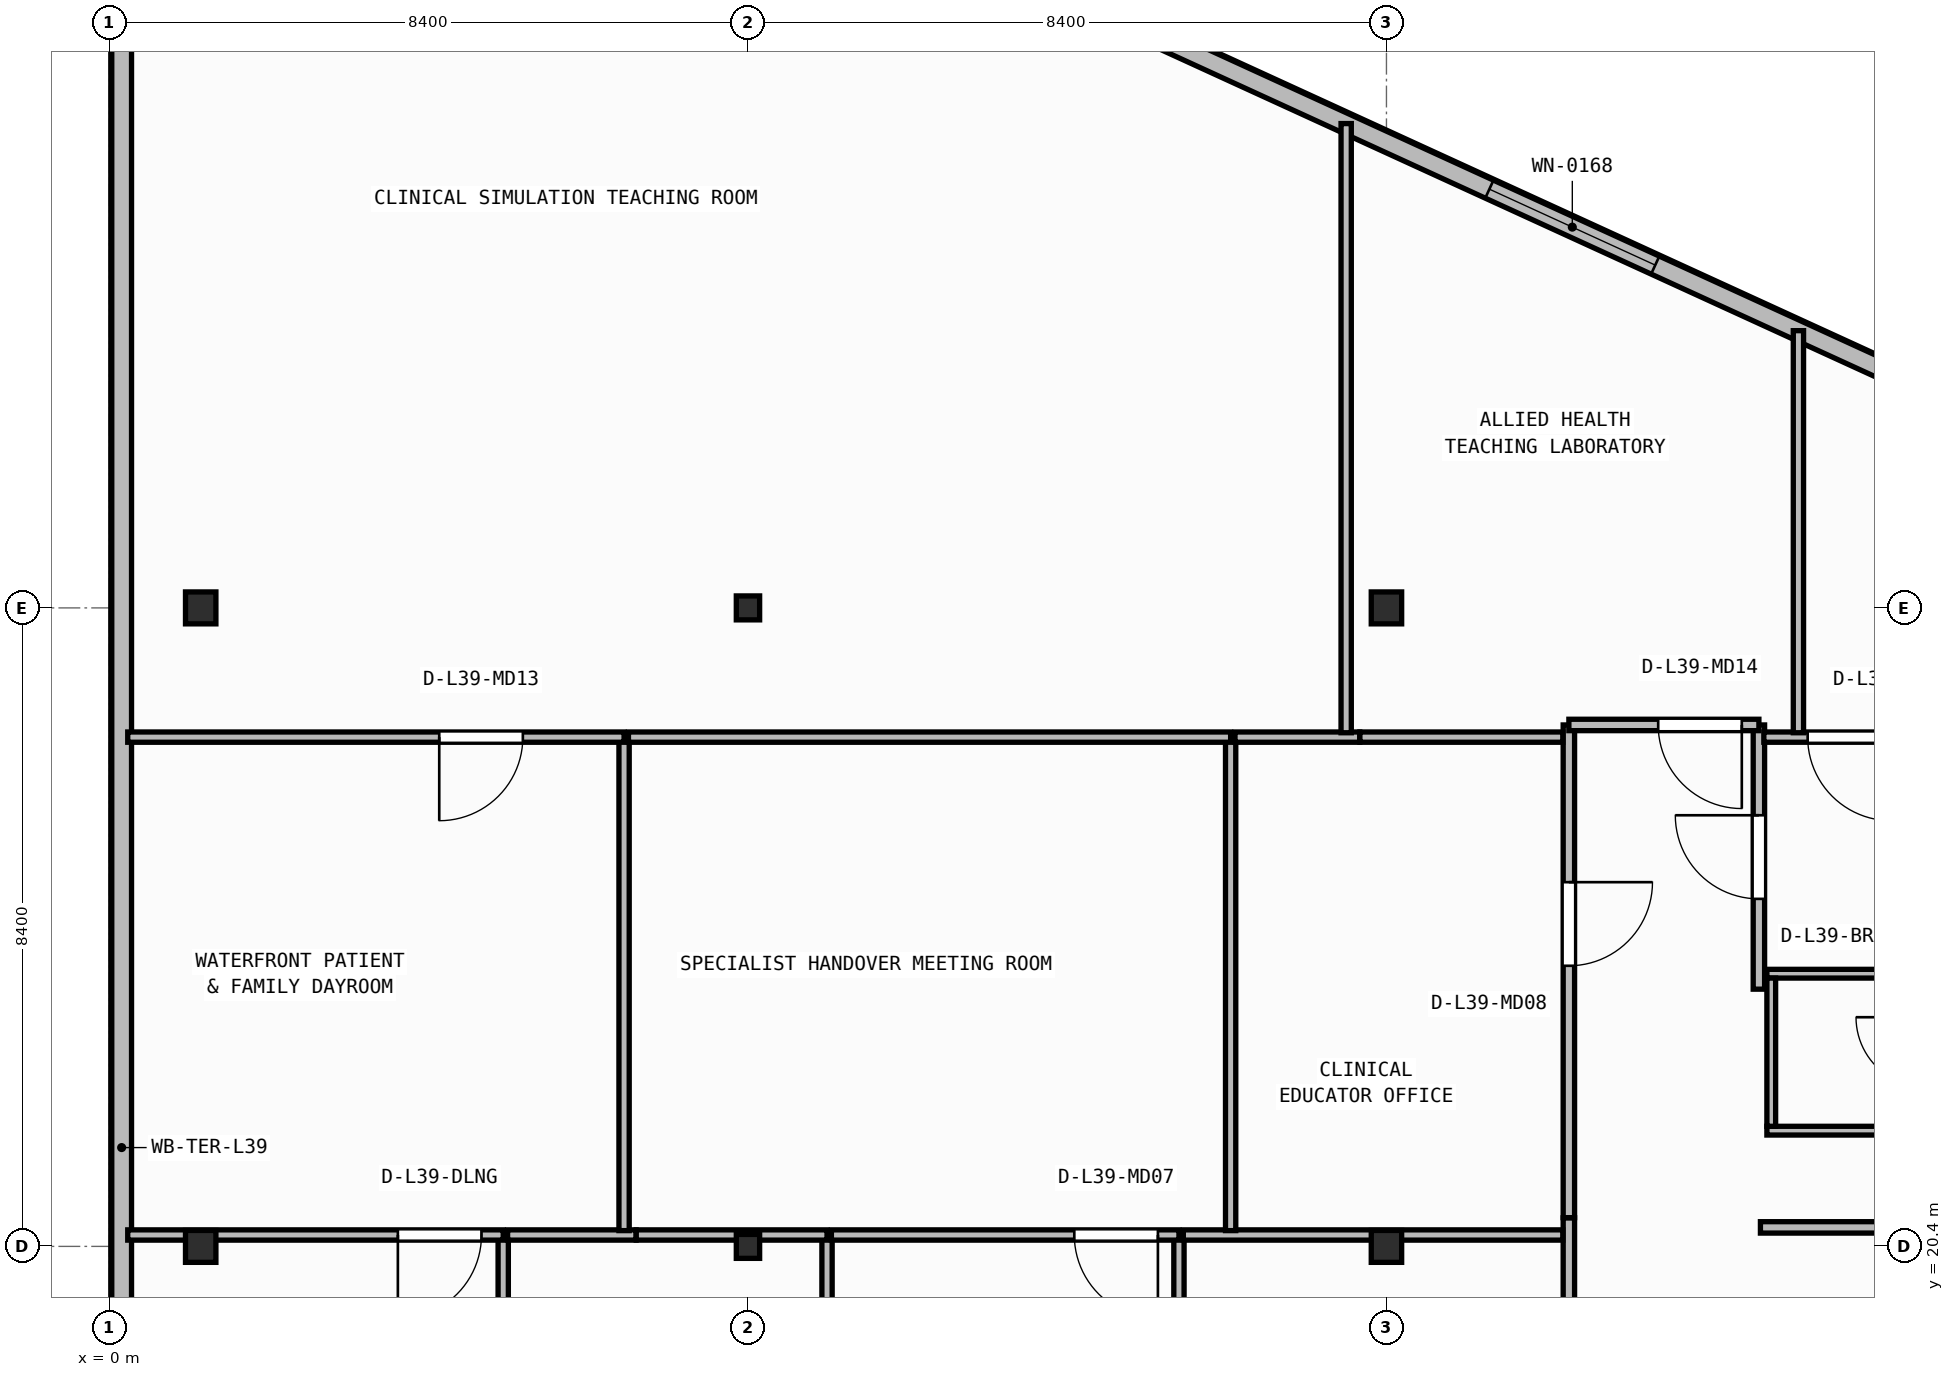
"""IFC4 building model, lengths in metres.
Left out: names, types, materials, properties, quantities, classifications, styles, units other than length and angle.
Written with IfcOpenShell. Run it as: python <this file> out.ifc"""

import sys

from ifc_helpers import new_model, si_unit, direction, frame, frame_2d, origin, origin_2d, place, context, subcontext, project, spatial, rectangle, i_section, extrude, element, fill, save


model = new_model("IFC4")
c1 = context("Model", 3, precision=1e-05, world=origin(), true_north=direction((0.0, 1.0)))
c2 = subcontext(c1, "Body", "Model", "MODEL_VIEW")
j1 = project(units=[si_unit("LENGTHUNIT", "METRE"), si_unit("PLANEANGLEUNIT", "RADIAN")], contexts=[c1])
p1 = place(None, origin())
s1 = spatial("IfcSite", under=j1, at=p1, CompositionType="ELEMENT")
p2 = place(p1, origin())
s2 = spatial("IfcBuilding", under=s1, at=p2, CompositionType="ELEMENT")
p3 = place(p2, frame((0.0, 0.0, 158.65)))
s3 = spatial("IfcBuildingStorey", under=s2, at=p3, CompositionType="ELEMENT", Elevation=158.65)
p4 = place(p3, frame((1.2, 20.4, 0.0), z_axis=(0.0, 0.0, 1.0), x_axis=(1.0, 0.0, 0.0)))
e1 = element("IfcColumn", 1, at=p4, inside=s3, PredefinedType="COLUMN", context=c2, shape_type="SweptSolid", body=[
    extrude(i_section(OverallWidth=0.4, OverallDepth=0.42, WebThickness=0.025, FlangeThickness=0.04, at=origin_2d()), origin(), (0.0, 0.0, 1.0), 3.95),
])
p5 = place(p3, frame((8.4, 20.4, 0.0), z_axis=(0.0, 0.0, 1.0), x_axis=(1.0, 0.0, 0.0)))
e2 = element("IfcColumn", 2, at=p5, inside=s3, PredefinedType="COLUMN", context=c2, shape_type="SweptSolid", body=[
    extrude(i_section(OverallWidth=0.307, OverallDepth=0.315, WebThickness=0.012, FlangeThickness=0.019, FilletRadius=0.017, at=origin_2d()), origin(), (0.0, 0.0, 1.0), 3.95),
])
for number, where, z_axis, x_axis in (
    (3, (16.8, 20.4, 0.0), (0.0, 0.0, 1.0), (1.0, 0.0, 0.0)),
    (4, (1.2, 28.8, 0.0), (0.0, 0.0, 1.0), (1.0, 0.0, 0.0)),
):
    element("IfcColumn", number, at=place(p3, frame(where, z_axis=z_axis, x_axis=x_axis)), inside=s3, PredefinedType="COLUMN", context=c2, shape_type="SweptSolid", body=[
        extrude(i_section(OverallWidth=0.4, OverallDepth=0.42, WebThickness=0.025, FlangeThickness=0.04, at=origin_2d()), origin(), (0.0, 0.0, 1.0), 3.95),
    ])
p6 = place(p3, frame((8.4, 28.8, 0.0), z_axis=(0.0, 0.0, 1.0), x_axis=(1.0, 0.0, 0.0)))
e5 = element("IfcColumn", 5, at=p6, inside=s3, PredefinedType="COLUMN", context=c2, shape_type="SweptSolid", body=[
    extrude(i_section(OverallWidth=0.307, OverallDepth=0.315, WebThickness=0.012, FlangeThickness=0.019, FilletRadius=0.017, at=origin_2d()), origin(), (0.0, 0.0, 1.0), 3.95),
])
p7 = place(p3, frame((16.8, 28.8, 0.0), z_axis=(0.0, 0.0, 1.0), x_axis=(1.0, 0.0, 0.0)))
e6 = element("IfcColumn", 6, at=p7, inside=s3, PredefinedType="COLUMN", context=c2, shape_type="SweptSolid", body=[
    extrude(i_section(OverallWidth=0.4, OverallDepth=0.42, WebThickness=0.025, FlangeThickness=0.04, at=origin_2d()), origin(), (0.0, 0.0, 1.0), 3.95),
])
p8 = place(p3, frame((23.818, 31.716, 0.0), z_axis=(0.0, 0.0, 1.0), x_axis=(-0.909209527513, 0.416338846471, 0.0)))
e7 = element("IfcWall", 7, at=p8, inside=s3, PredefinedType="STANDARD", context=c2, shape_type="SweptSolid", body=[
    extrude(rectangle(XDim=13.787, YDim=0.26, at=frame_2d((6.894, 0.0))), origin(), (0.0, 0.0, 1.0), 3.71),
])
p9 = place(p8, frame((3.829, 0.0, 0.9)))
e8 = element("IfcOpeningElement", 8, at=p9, cuts=e7, PredefinedType="OPENING", context=c2, shape_type="SweptSolid", body=[
    extrude(rectangle(XDim=2.4, YDim=1.65, at=frame_2d((1.2, 0.825))), frame((0.0, 0.14, 0.0), z_axis=(0.0, -1.0, 0.0), x_axis=(1.0, 0.0, 0.0)), (0.0, 0.0, 1.0), 0.28),
])
p10 = place(p3, frame((0.16, 40.64, 0.0), z_axis=(0.0, 0.0, 1.0), x_axis=(0.0, -1.0, 0.0)))
e9 = element("IfcWall", 9, at=p10, inside=s3, PredefinedType="STANDARD", context=c2, shape_type="SweptSolid", body=[
    extrude(rectangle(XDim=37.88, YDim=0.26, at=frame_2d((18.94, 0.0))), origin(), (0.0, 0.0, 1.0), 3.71),
])
p11 = place(p10, frame((29.865, 0.0, 0.0)))
e10 = element("IfcOpeningElement", 10, at=p11, cuts=e9, PredefinedType="OPENING", context=c2, shape_type="SweptSolid", body=[
    extrude(rectangle(XDim=1.3, YDim=2.15, at=frame_2d((0.65, 1.075))), frame((0.0, 0.14, 0.0), z_axis=(0.0, -1.0, 0.0), x_axis=(1.0, 0.0, 0.0)), (0.0, 0.0, 1.0), 0.28),
])
for number, where, z_axis, x_axis in (
    (11, (21.805, 21.923, 0.0), (0.0, 0.0, 1.0), (1.0, 0.0, 0.0)),
    (12, (21.805, 23.988, 0.0), (0.0, 0.0, 1.0), (1.0, 0.0, 0.0)),
):
    element("IfcWall", number, at=place(p3, frame(where, z_axis=z_axis, x_axis=x_axis)), inside=s3, PredefinedType="PARTITIONING", context=c2, shape_type="SweptSolid", body=[
        extrude(rectangle(XDim=2.15, YDim=0.115, at=frame_2d((1.075, 0.0))), origin(), (0.0, 0.0, 1.0), 3.71),
    ])
p12 = place(p3, frame((21.863, 21.98, 0.0), z_axis=(0.0, 0.0, 1.0), x_axis=(0.0, 1.0, 0.0)))
e13 = element("IfcWall", 13, at=p12, inside=s3, PredefinedType="PARTITIONING", context=c2, shape_type="SweptSolid", body=[
    extrude(rectangle(XDim=1.95, YDim=0.115, at=frame_2d((0.975, 0.0))), origin(), (0.0, 0.0, 1.0), 3.71),
])
p13 = place(p3, frame((19.2, 20.776, 0.0), z_axis=(0.0, 0.0, 1.0), x_axis=(0.0, -1.0, 0.0)))
e14 = element("IfcWall", 14, at=p13, inside=s3, PredefinedType="PARTITIONING", context=c2, shape_type="SweptSolid", body=[
    extrude(rectangle(XDim=6.076, YDim=0.15, at=frame_2d((3.038, 0.0))), origin(), (0.0, 0.0, 1.0), 3.71),
])
p14 = place(p3, frame((19.2, 27.26, 0.0), z_axis=(0.0, 0.0, 1.0), x_axis=(0.0, -1.0, 0.0)))
e15 = element("IfcWall", 15, at=p14, inside=s3, PredefinedType="PARTITIONING", context=c2, shape_type="SweptSolid", body=[
    extrude(rectangle(XDim=6.482, YDim=0.15, at=frame_2d((3.241, 0.0))), origin(), (0.0, 0.0, 1.0), 3.71),
])
p15 = place(p14, frame((2.068, 0.0, 0.0)))
e16 = element("IfcOpeningElement", 16, at=p15, cuts=e15, PredefinedType="OPENING", context=c2, shape_type="SweptSolid", body=[
    extrude(rectangle(XDim=1.1, YDim=2.1, at=frame_2d((0.55, 1.05))), frame((0.0, 0.085, 0.0), z_axis=(0.0, -1.0, 0.0), x_axis=(1.0, 0.0, 0.0)), (0.0, 0.0, 1.0), 0.17),
])
p16 = place(p3, frame((21.7, 23.784, 0.0), z_axis=(0.0, 0.0, 1.0), x_axis=(0.0, 1.0, 0.0)))
e17 = element("IfcWall", 17, at=p16, inside=s3, PredefinedType="PARTITIONING", context=c2, shape_type="SweptSolid", body=[
    extrude(rectangle(XDim=3.476, YDim=0.15, at=frame_2d((1.738, 0.0))), origin(), (0.0, 0.0, 1.0), 3.71),
])
p17 = place(p16, frame((1.188, 0.0, 0.0)))
e18 = element("IfcOpeningElement", 18, at=p17, cuts=e17, PredefinedType="OPENING", context=c2, shape_type="SweptSolid", body=[
    extrude(rectangle(XDim=1.1, YDim=2.1, at=frame_2d((0.55, 1.05))), frame((0.0, 0.085, 0.0), z_axis=(0.0, -1.0, 0.0), x_axis=(1.0, 0.0, 0.0)), (0.0, 0.0, 1.0), 0.17),
])
p18 = place(p3, frame((21.7, 27.26, 0.0), z_axis=(0.0, 0.0, 1.0), x_axis=(-1.0, 0.0, 0.0)))
e19 = element("IfcWall", 19, at=p18, inside=s3, PredefinedType="PARTITIONING", context=c2, shape_type="SweptSolid", body=[
    extrude(rectangle(XDim=2.5, YDim=0.15, at=frame_2d((1.25, 0.0))), origin(), (0.0, 0.0, 1.0), 3.71),
])
p19 = place(p18, frame((0.225, 0.0, 0.0)))
e20 = element("IfcOpeningElement", 20, at=p19, cuts=e19, PredefinedType="OPENING", context=c2, shape_type="SweptSolid", body=[
    extrude(rectangle(XDim=1.1, YDim=2.1, at=frame_2d((0.55, 1.05))), frame((0.0, 0.085, 0.0), z_axis=(0.0, -1.0, 0.0), x_axis=(1.0, 0.0, 0.0)), (0.0, 0.0, 1.0), 0.17),
])
p20 = place(p3, frame((27.256, 20.65, 0.0), z_axis=(0.0, 0.0, 1.0), x_axis=(-1.0, 0.0, 0.0)))
e21 = element("IfcWall", 21, at=p20, inside=s3, PredefinedType="PARTITIONING", context=c2, shape_type="SweptSolid", body=[
    extrude(rectangle(XDim=5.536, YDim=0.15, at=frame_2d((2.768, 0.0))), origin(), (0.0, 0.0, 1.0), 3.083),
])
p21 = place(p3, frame((5.18, 17.14, 0.0), z_axis=(0.0, 0.0, 1.0), x_axis=(0.0, 1.0, 0.0)))
e22 = element("IfcWall", 22, at=p21, inside=s3, PredefinedType="PARTITIONING", context=c2, shape_type="SweptSolid", body=[
    extrude(rectangle(XDim=3.41, YDim=0.135, at=frame_2d((1.705, 0.0))), origin(), (0.0, 0.0, 1.0), 3.71),
])
p22 = place(p3, frame((5.18, 20.55, 0.0), z_axis=(0.0, 0.0, 1.0), x_axis=(-1.0, 0.0, 0.0)))
e23 = element("IfcWall", 23, at=p22, inside=s3, PredefinedType="PARTITIONING", context=c2, shape_type="SweptSolid", body=[
    extrude(rectangle(XDim=4.94, YDim=0.135, at=frame_2d((2.47, 0.0))), origin(), (0.0, 0.0, 1.0), 3.083),
])
p23 = place(p22, frame((0.286, 0.0, 0.0)))
e24 = element("IfcOpeningElement", 24, at=p23, cuts=e23, PredefinedType="OPENING", context=c2, shape_type="SweptSolid", body=[
    extrude(rectangle(XDim=1.1, YDim=2.1, at=frame_2d((0.55, 1.05))), frame((0.0, 0.077, 0.0), z_axis=(0.0, -1.0, 0.0), x_axis=(1.0, 0.0, 0.0)), (0.0, 0.0, 1.0), 0.155),
])
p24 = place(p3, frame((9.44, 17.833, 0.0), z_axis=(0.0, 0.0, 1.0), x_axis=(0.0, 1.0, 0.0)))
e25 = element("IfcWall", 25, at=p24, inside=s3, PredefinedType="PARTITIONING", context=c2, shape_type="SweptSolid", body=[
    extrude(rectangle(XDim=2.718, YDim=0.135, at=frame_2d((1.359, 0.0))), origin(), (0.0, 0.0, 1.0), 3.71),
])
p25 = place(p3, frame((6.928, 20.55, 0.0), z_axis=(0.0, 0.0, 1.0), x_axis=(-1.0, 0.0, 0.0)))
e26 = element("IfcWall", 26, at=p25, inside=s3, PredefinedType="PARTITIONING", context=c2, shape_type="SweptSolid", body=[
    extrude(rectangle(XDim=1.691, YDim=0.135, at=frame_2d((0.845, 0.0))), origin(), (0.0, 0.0, 1.0), 3.083),
])
p26 = place(p3, frame((9.44, 20.55, 0.0), z_axis=(0.0, 0.0, 1.0), x_axis=(-1.0, 0.0, 0.0)))
e27 = element("IfcWall", 27, at=p26, inside=s3, PredefinedType="PARTITIONING", context=c2, shape_type="SweptSolid", body=[
    extrude(rectangle(XDim=2.51, YDim=0.135, at=frame_2d((1.255, 0.0))), origin(), (0.0, 0.0, 1.0), 3.083),
])
p27 = place(p3, frame((14.07, 17.833, 0.0), z_axis=(0.0, 0.0, 1.0), x_axis=(0.0, 1.0, 0.0)))
e28 = element("IfcWall", 28, at=p27, inside=s3, PredefinedType="PARTITIONING", context=c2, shape_type="SweptSolid", body=[
    extrude(rectangle(XDim=2.718, YDim=0.135, at=frame_2d((1.359, 0.0))), origin(), (0.0, 0.0, 1.0), 3.71),
])
p28 = place(p3, frame((14.07, 20.55, 0.0), z_axis=(0.0, 0.0, 1.0), x_axis=(-1.0, 0.0, 0.0)))
e29 = element("IfcWall", 29, at=p28, inside=s3, PredefinedType="PARTITIONING", context=c2, shape_type="SweptSolid", body=[
    extrude(rectangle(XDim=4.573, YDim=0.135, at=frame_2d((2.286, 0.0))), origin(), (0.0, 0.0, 1.0), 3.083),
])
p29 = place(p28, frame((0.277, 0.0, 0.0)))
e30 = element("IfcOpeningElement", 30, at=p29, cuts=e29, PredefinedType="OPENING", context=c2, shape_type="SweptSolid", body=[
    extrude(rectangle(XDim=1.1, YDim=2.1, at=frame_2d((0.55, 1.05))), frame((0.0, 0.077, 0.0), z_axis=(0.0, -1.0, 0.0), x_axis=(1.0, 0.0, 0.0)), (0.0, 0.0, 1.0), 0.155),
])
p30 = place(p3, frame((19.12, 20.55, 0.0), z_axis=(0.0, 0.0, 1.0), x_axis=(-1.0, 0.0, 0.0)))
e31 = element("IfcWall", 31, at=p30, inside=s3, PredefinedType="PARTITIONING", context=c2, shape_type="SweptSolid", body=[
    extrude(rectangle(XDim=4.993, YDim=0.135, at=frame_2d((2.496, 0.0))), origin(), (0.0, 0.0, 1.0), 3.083),
])
p31 = place(p3, frame((6.77, 20.607, 0.0), z_axis=(0.0, 0.0, 1.0), x_axis=(0.0, 1.0, 0.0)))
e32 = element("IfcWall", 32, at=p31, inside=s3, PredefinedType="PARTITIONING", context=c2, shape_type="SweptSolid", body=[
    extrude(rectangle(XDim=6.493, YDim=0.135, at=frame_2d((3.246, 0.0))), origin(), (0.0, 0.0, 1.0), 3.71),
])
p32 = place(p3, frame((6.77, 27.1, 0.0), z_axis=(0.0, 0.0, 1.0), x_axis=(-1.0, 0.0, 0.0)))
e33 = element("IfcWall", 33, at=p32, inside=s3, PredefinedType="PARTITIONING", context=c2, shape_type="SweptSolid", body=[
    extrude(rectangle(XDim=6.53, YDim=0.135, at=frame_2d((3.265, 0.0))), origin(), (0.0, 0.0, 1.0), 3.71),
])
p33 = place(p32, frame((1.332, 0.0, 0.0)))
e34 = element("IfcOpeningElement", 34, at=p33, cuts=e33, PredefinedType="OPENING", context=c2, shape_type="SweptSolid", body=[
    extrude(rectangle(XDim=1.1, YDim=2.1, at=frame_2d((0.55, 1.05))), frame((0.0, 0.077, 0.0), z_axis=(0.0, -1.0, 0.0), x_axis=(1.0, 0.0, 0.0)), (0.0, 0.0, 1.0), 0.155),
])
p34 = place(p3, frame((14.75, 20.607, 0.0), z_axis=(0.0, 0.0, 1.0), x_axis=(0.0, 1.0, 0.0)))
e35 = element("IfcWall", 35, at=p34, inside=s3, PredefinedType="PARTITIONING", context=c2, shape_type="SweptSolid", body=[
    extrude(rectangle(XDim=6.493, YDim=0.135, at=frame_2d((3.246, 0.0))), origin(), (0.0, 0.0, 1.0), 3.71),
])
p35 = place(p3, frame((14.75, 27.1, 0.0), z_axis=(0.0, 0.0, 1.0), x_axis=(-1.0, 0.0, 0.0)))
e36 = element("IfcWall", 36, at=p35, inside=s3, PredefinedType="PARTITIONING", context=c2, shape_type="SweptSolid", body=[
    extrude(rectangle(XDim=7.923, YDim=0.135, at=frame_2d((3.961, 0.0))), origin(), (0.0, 0.0, 1.0), 3.71),
])
p36 = place(p3, frame((16.448, 27.1, 0.0), z_axis=(0.0, 0.0, 1.0), x_axis=(-1.0, 0.0, 0.0)))
e37 = element("IfcWall", 37, at=p36, inside=s3, PredefinedType="PARTITIONING", context=c2, shape_type="SweptSolid", body=[
    extrude(rectangle(XDim=1.641, YDim=0.135, at=frame_2d((0.82, 0.0))), origin(), (0.0, 0.0, 1.0), 3.71),
])
p37 = place(p3, frame((19.12, 27.1, 0.0), z_axis=(0.0, 0.0, 1.0), x_axis=(-1.0, 0.0, 0.0)))
e38 = element("IfcWall", 38, at=p37, inside=s3, PredefinedType="PARTITIONING", context=c2, shape_type="SweptSolid", body=[
    extrude(rectangle(XDim=2.67, YDim=0.135, at=frame_2d((1.335, 0.0))), origin(), (0.0, 0.0, 1.0), 3.71),
])
p38 = place(p3, frame((27.03, 27.1, 0.0), z_axis=(0.0, 0.0, 1.0), x_axis=(-1.0, 0.0, 0.0)))
e39 = element("IfcWall", 39, at=p38, inside=s3, PredefinedType="PARTITIONING", context=c2, shape_type="SweptSolid", body=[
    extrude(rectangle(XDim=5.265, YDim=0.135, at=frame_2d((2.633, 0.0))), origin(), (0.0, 0.0, 1.0), 3.71),
])
p39 = place(p38, frame((3.588, 0.0, 0.0)))
e40 = element("IfcOpeningElement", 40, at=p39, cuts=e39, PredefinedType="OPENING", context=c2, shape_type="SweptSolid", body=[
    extrude(rectangle(XDim=1.1, YDim=2.1, at=frame_2d((0.55, 1.05))), frame((0.0, 0.077, 0.0), z_axis=(0.0, -1.0, 0.0), x_axis=(1.0, 0.0, 0.0)), (0.0, 0.0, 1.0), 0.155),
])
p40 = place(p3, frame((16.27, 27.157, 0.0), z_axis=(0.0, 0.0, 1.0), x_axis=(0.0, 1.0, 0.0)))
e41 = element("IfcWall", 41, at=p40, inside=s3, PredefinedType="PARTITIONING", context=c2, shape_type="SweptSolid", body=[
    extrude(rectangle(XDim=8.014, YDim=0.135, at=frame_2d((4.007, 0.0))), origin(), (0.0, 0.0, 1.0), 3.71),
])
p41 = place(p3, frame((22.22, 27.157, 0.0), z_axis=(0.0, 0.0, 1.0), x_axis=(0.0, 1.0, 0.0)))
e42 = element("IfcWall", 42, at=p41, inside=s3, PredefinedType="PARTITIONING", context=c2, shape_type="SweptSolid", body=[
    extrude(rectangle(XDim=5.29, YDim=0.135, at=frame_2d((2.645, 0.0))), origin(), (0.0, 0.0, 1.0), 3.71),
])
p42 = place(p9, origin())
e43 = element("IfcWindow", 43, at=p42, inside=s3, PartitioningType="SINGLE_PANEL", PredefinedType="WINDOW", context=c2, shape_type="SweptSolid", body=[
    extrude(rectangle(XDim=2.4, YDim=1.65, at=frame_2d((1.2, 0.825))), frame((0.0, 0.03, 0.0), z_axis=(0.0, -1.0, 0.0), x_axis=(1.0, 0.0, 0.0)), (0.0, 0.0, 1.0), 0.06),
])
fill(e8, e43)
p43 = place(p15, origin())
e44 = element("IfcDoor", 44, at=p43, inside=s3, OperationType="SINGLE_SWING_LEFT", PredefinedType="DOOR", context=c2, shape_type="SweptSolid", body=[
    extrude(rectangle(XDim=1.1, YDim=2.1, at=frame_2d((0.55, 1.05))), frame((0.0, 0.025, 0.0), z_axis=(0.0, -1.0, 0.0), x_axis=(1.0, 0.0, 0.0)), (0.0, 0.0, 1.0), 0.05),
])
fill(e16, e44)
p44 = place(p17, origin())
e45 = element("IfcDoor", 45, at=p44, inside=s3, OperationType="SINGLE_SWING_RIGHT", PredefinedType="DOOR", context=c2, shape_type="SweptSolid", body=[
    extrude(rectangle(XDim=1.1, YDim=2.1, at=frame_2d((0.55, 1.05))), frame((0.0, 0.025, 0.0), z_axis=(0.0, -1.0, 0.0), x_axis=(1.0, 0.0, 0.0)), (0.0, 0.0, 1.0), 0.05),
])
fill(e18, e45)
p45 = place(p19, origin())
e46 = element("IfcDoor", 46, at=p45, inside=s3, OperationType="SINGLE_SWING_LEFT", PredefinedType="DOOR", context=c2, shape_type="SweptSolid", body=[
    extrude(rectangle(XDim=1.1, YDim=2.1, at=frame_2d((0.55, 1.05))), frame((0.0, 0.025, 0.0), z_axis=(0.0, -1.0, 0.0), x_axis=(1.0, 0.0, 0.0)), (0.0, 0.0, 1.0), 0.05),
])
fill(e20, e46)
p46 = place(p23, origin())
e47 = element("IfcDoor", 47, at=p46, inside=s3, OperationType="SINGLE_SWING_RIGHT", PredefinedType="DOOR", context=c2, shape_type="SweptSolid", body=[
    extrude(rectangle(XDim=1.1, YDim=2.1, at=frame_2d((0.55, 1.05))), frame((0.0, 0.025, 0.0), z_axis=(0.0, -1.0, 0.0), x_axis=(1.0, 0.0, 0.0)), (0.0, 0.0, 1.0), 0.05),
])
fill(e24, e47)
p47 = place(p29, origin())
e48 = element("IfcDoor", 48, at=p47, inside=s3, OperationType="SINGLE_SWING_LEFT", PredefinedType="DOOR", context=c2, shape_type="SweptSolid", body=[
    extrude(rectangle(XDim=1.1, YDim=2.1, at=frame_2d((0.55, 1.05))), frame((0.0, 0.025, 0.0), z_axis=(0.0, -1.0, 0.0), x_axis=(1.0, 0.0, 0.0)), (0.0, 0.0, 1.0), 0.05),
])
fill(e30, e48)
p48 = place(p33, origin())
e49 = element("IfcDoor", 49, at=p48, inside=s3, OperationType="SINGLE_SWING_RIGHT", PredefinedType="DOOR", context=c2, shape_type="SweptSolid", body=[
    extrude(rectangle(XDim=1.1, YDim=2.1, at=frame_2d((0.55, 1.05))), frame((0.0, 0.025, 0.0), z_axis=(0.0, -1.0, 0.0), x_axis=(1.0, 0.0, 0.0)), (0.0, 0.0, 1.0), 0.05),
])
fill(e34, e49)
p49 = place(p39, origin())
e50 = element("IfcDoor", 50, at=p49, inside=s3, OperationType="SINGLE_SWING_LEFT", PredefinedType="DOOR", context=c2, shape_type="SweptSolid", body=[
    extrude(rectangle(XDim=1.1, YDim=2.1, at=frame_2d((0.55, 1.05))), frame((0.0, 0.025, 0.0), z_axis=(0.0, -1.0, 0.0), x_axis=(1.0, 0.0, 0.0)), (0.0, 0.0, 1.0), 0.05),
])
fill(e40, e50)
save(model, sys.argv[1])
